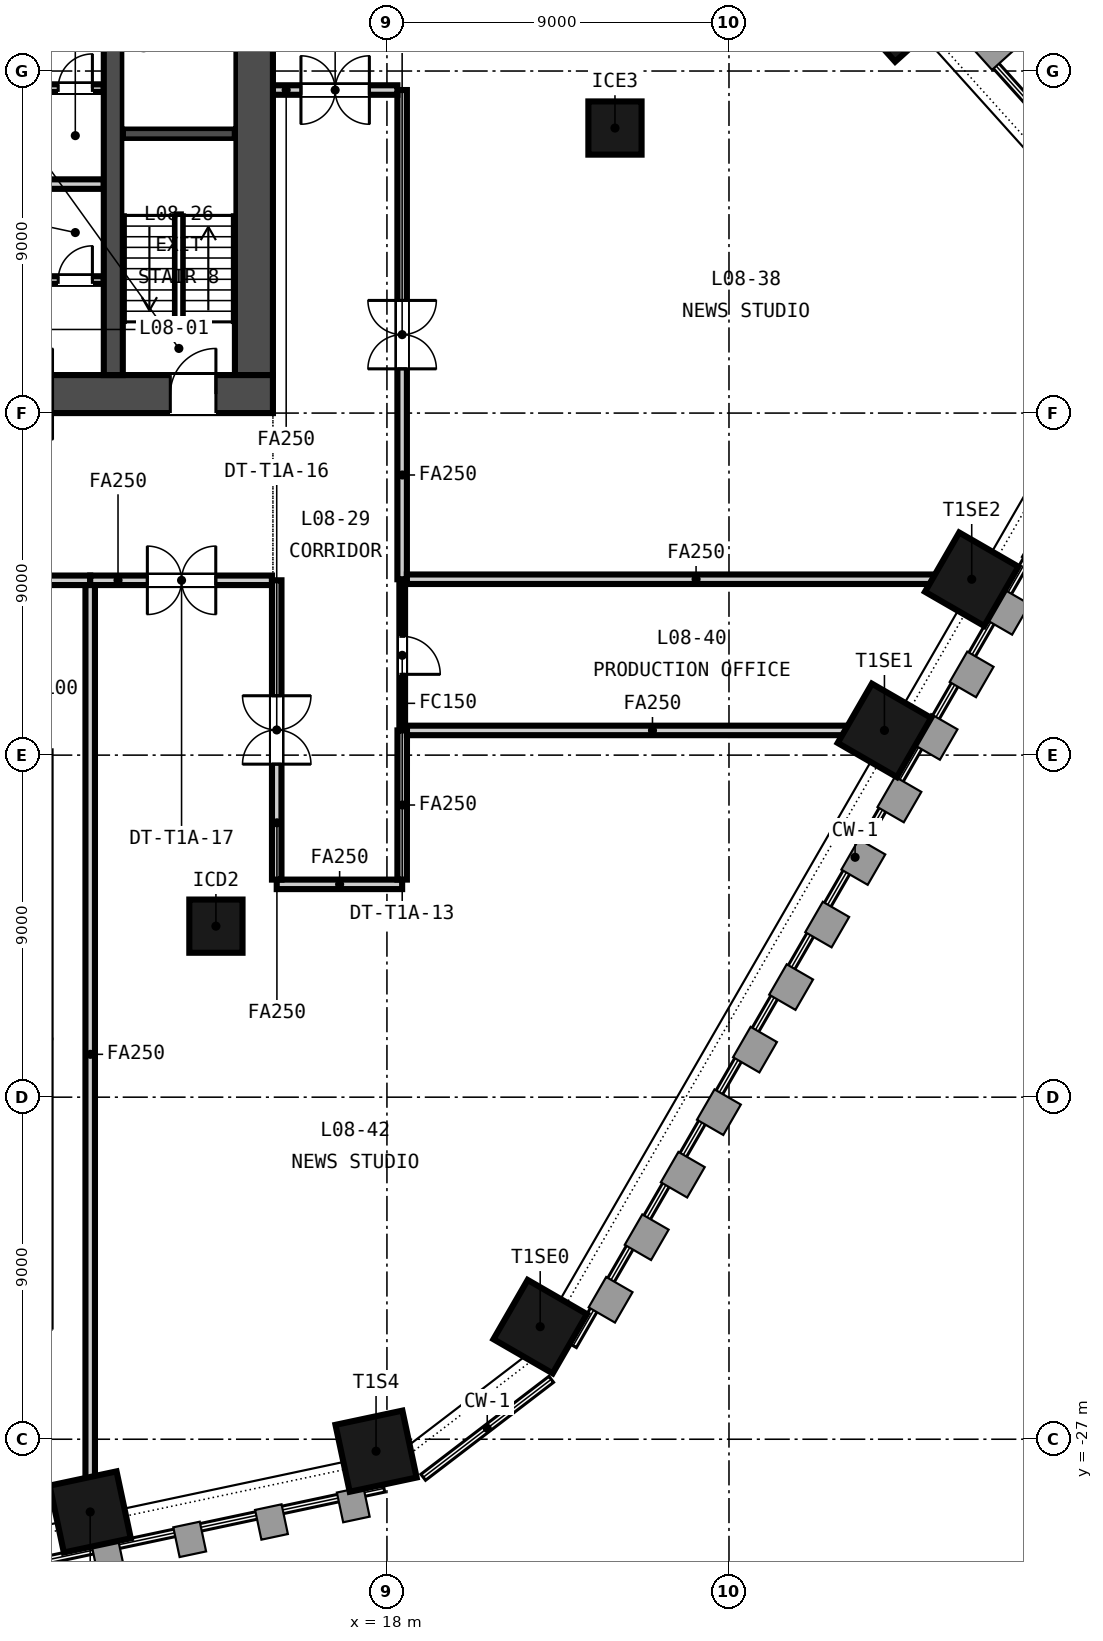
"""IFC4 building model, lengths in metres.
Left out: names, types, materials, properties, quantities, classifications, styles, units other than length and angle.
Written with IfcOpenShell. Run it as: python <this file> out.ifc"""

import sys

from ifc_helpers import new_model, si_unit, direction, frame, frame_2d, origin, origin_2d, place, context, subcontext, project, spatial, rectangle, extrude, element, fill, save


model = new_model("IFC4")
c1 = context("Model", 3, precision=1e-05, world=origin(), true_north=direction((0.0, 1.0)))
c2 = subcontext(c1, "Body", "Model", "MODEL_VIEW")
j1 = project(units=[si_unit("LENGTHUNIT", "METRE"), si_unit("PLANEANGLEUNIT", "RADIAN")], contexts=[c1])
p1 = place(None, origin())
s1 = spatial("IfcSite", under=j1, at=p1, CompositionType="ELEMENT")
p2 = place(p1, origin())
s2 = spatial("IfcBuilding", under=s1, at=p2, CompositionType="ELEMENT")
p3 = place(p2, frame((0.0, 0.0, 43.3)))
s3 = spatial("IfcBuildingStorey", under=s2, at=p3, CompositionType="ELEMENT", Elevation=43.3)
p4 = place(p3, frame((-15.0, 0.5, -0.15), z_axis=(0.0, 0.0, 1.0), x_axis=(1.0, 0.0, 0.0)))
e1 = element("IfcWall", 1, at=p4, inside=s3, PredefinedType="SOLIDWALL", context=c2, shape_type="SweptSolid", body=[
    extrude(rectangle(XDim=30.0, YDim=1.0, at=frame_2d((15.0, 0.0))), origin(), (0.0, 0.0, 1.0), 3.65),
])
p5 = place(p4, frame((5.8, 0.0, 0.15)))
e2 = element("IfcOpeningElement", 2, at=p5, cuts=e1, PredefinedType="OPENING", context=c2, shape_type="SweptSolid", body=[
    extrude(rectangle(XDim=2.4, YDim=2.4, at=frame_2d((1.2, 1.2))), frame((0.0, 0.51, 0.0), z_axis=(0.0, -1.0, 0.0), x_axis=(1.0, 0.0, 0.0)), (0.0, 0.0, 1.0), 1.02),
])
p6 = place(p4, frame((13.8, 0.0, 0.15)))
e3 = element("IfcOpeningElement", 3, at=p6, cuts=e1, PredefinedType="OPENING", context=c2, shape_type="SweptSolid", body=[
    extrude(rectangle(XDim=2.4, YDim=2.4, at=frame_2d((1.2, 1.2))), frame((0.0, 0.51, 0.0), z_axis=(0.0, -1.0, 0.0), x_axis=(1.0, 0.0, 0.0)), (0.0, 0.0, 1.0), 1.02),
])
p7 = place(p4, frame((21.8, 0.0, 0.15)))
e4 = element("IfcOpeningElement", 4, at=p7, cuts=e1, PredefinedType="OPENING", context=c2, shape_type="SweptSolid", body=[
    extrude(rectangle(XDim=2.4, YDim=2.4, at=frame_2d((1.2, 1.2))), frame((0.0, 0.51, 0.0), z_axis=(0.0, -1.0, 0.0), x_axis=(1.0, 0.0, 0.0)), (0.0, 0.0, 1.0), 1.02),
])
p8 = place(p4, frame((1.5, 0.0, 0.15)))
e5 = element("IfcOpeningElement", 5, at=p8, cuts=e1, PredefinedType="OPENING", context=c2, shape_type="SweptSolid", body=[
    extrude(rectangle(XDim=1.2, YDim=2.1, at=frame_2d((0.6, 1.05))), frame((0.0, 0.51, 0.0), z_axis=(0.0, -1.0, 0.0), x_axis=(1.0, 0.0, 0.0)), (0.0, 0.0, 1.0), 1.02),
])
p9 = place(p4, frame((27.3, 0.0, 0.15)))
e6 = element("IfcOpeningElement", 6, at=p9, cuts=e1, PredefinedType="OPENING", context=c2, shape_type="SweptSolid", body=[
    extrude(rectangle(XDim=1.2, YDim=2.1, at=frame_2d((0.6, 1.05))), frame((0.0, 0.51, 0.0), z_axis=(0.0, -1.0, 0.0), x_axis=(1.0, 0.0, 0.0)), (0.0, 0.0, 1.0), 1.02),
])
p10 = place(p3, frame((14.5, 1.0, -0.15), z_axis=(0.0, 0.0, 1.0), x_axis=(0.0, 1.0, 0.0)))
e7 = element("IfcWall", 7, at=p10, inside=s3, PredefinedType="SOLIDWALL", context=c2, shape_type="SweptSolid", body=[
    extrude(rectangle(XDim=13.0, YDim=1.0, at=frame_2d((6.5, 0.0))), origin(), (0.0, 0.0, 1.0), 3.65),
])
p11 = place(p3, frame((10.8, 1.0, -0.15), z_axis=(0.0, 0.0, 1.0), x_axis=(0.0, 1.0, 0.0)))
e8 = element("IfcWall", 8, at=p11, inside=s3, PredefinedType="SOLIDWALL", context=c2, shape_type="SweptSolid", body=[
    extrude(rectangle(XDim=13.0, YDim=0.5, at=frame_2d((6.5, 0.0))), origin(), (0.0, 0.0, 1.0), 3.65),
])
for number, where, z_axis, x_axis in (
    (9, (10.192, -28.914, -0.15), (0.0, 0.0, 1.0), (0.978, 0.208, 0.0)),
    (10, (17.714, -27.315, -0.15), (0.0, 0.0, 1.0), (0.978, 0.208, 0.0)),
    (11, (22.032, -24.039, -0.15), (0.0, 0.0, 1.0), (0.5, 0.866, 0.0)),
    (12, (31.09, -8.35, -0.15), (0.0, 0.0, 1.0), (0.5, 0.866, 0.0)),
    (13, (33.387, -4.373, -0.15), (0.0, 0.0, 1.0), (0.5, 0.866, 0.0)),
    (14, (31.438, 10.517, -0.15), (0.0, 0.0, 1.0), (-0.669, 0.743, 0.0)),
):
    element("IfcColumn", number, at=place(p3, frame(where, z_axis=z_axis, x_axis=x_axis)), inside=s3, PredefinedType="COLUMN", context=c2, shape_type="SweptSolid", body=[
        extrude(rectangle(XDim=1.8, YDim=1.8, at=origin_2d()), origin(), (0.0, 0.0, 1.0), 3.65),
    ])
for number, where, z_axis, x_axis in (
    (15, (13.5, -13.5, -0.15), (0.0, 0.0, 1.0), (1.0, 0.0, 0.0)),
    (16, (24.0, 7.5, -0.15), (0.0, 0.0, 1.0), (1.0, 0.0, 0.0)),
):
    element("IfcColumn", number, at=place(p3, frame(where, z_axis=z_axis, x_axis=x_axis)), inside=s3, PredefinedType="COLUMN", context=c2, shape_type="SweptSolid", body=[
        extrude(rectangle(XDim=1.4, YDim=1.4, at=origin_2d()), origin(), (0.0, 0.0, 1.0), 3.65),
    ])
p12 = place(p3, frame((-10.55, 3.5, 0.0), z_axis=(0.0, 0.0, 1.0), x_axis=(1.0, 0.0, 0.0)))
e17 = element("IfcWall", 17, at=p12, inside=s3, PredefinedType="PARTITIONING", context=c2, shape_type="SweptSolid", body=[
    extrude(rectangle(XDim=21.1, YDim=0.2, at=frame_2d((10.55, 0.0))), origin(), (0.0, 0.0, 1.0), 3.5),
])
p13 = place(p12, frame((0.675, 0.0, 0.0)))
e18 = element("IfcOpeningElement", 18, at=p13, cuts=e17, PredefinedType="OPENING", context=c2, shape_type="SweptSolid", body=[
    extrude(rectangle(XDim=1.2, YDim=2.1, at=frame_2d((0.6, 1.05))), frame((0.0, 0.11, 0.0), z_axis=(0.0, -1.0, 0.0), x_axis=(1.0, 0.0, 0.0)), (0.0, 0.0, 1.0), 0.22),
])
p14 = place(p12, frame((3.475, 0.0, 0.0)))
e19 = element("IfcOpeningElement", 19, at=p14, cuts=e17, PredefinedType="OPENING", context=c2, shape_type="SweptSolid", body=[
    extrude(rectangle(XDim=1.2, YDim=2.1, at=frame_2d((0.6, 1.05))), frame((0.0, 0.11, 0.0), z_axis=(0.0, -1.0, 0.0), x_axis=(1.0, 0.0, 0.0)), (0.0, 0.0, 1.0), 0.22),
])
p15 = place(p12, frame((6.275, 0.0, 0.0)))
e20 = element("IfcOpeningElement", 20, at=p15, cuts=e17, PredefinedType="OPENING", context=c2, shape_type="SweptSolid", body=[
    extrude(rectangle(XDim=1.2, YDim=2.1, at=frame_2d((0.6, 1.05))), frame((0.0, 0.11, 0.0), z_axis=(0.0, -1.0, 0.0), x_axis=(1.0, 0.0, 0.0)), (0.0, 0.0, 1.0), 0.22),
])
p16 = place(p12, frame((9.075, 0.0, 0.0)))
e21 = element("IfcOpeningElement", 21, at=p16, cuts=e17, PredefinedType="OPENING", context=c2, shape_type="SweptSolid", body=[
    extrude(rectangle(XDim=1.2, YDim=2.1, at=frame_2d((0.6, 1.05))), frame((0.0, 0.11, 0.0), z_axis=(0.0, -1.0, 0.0), x_axis=(1.0, 0.0, 0.0)), (0.0, 0.0, 1.0), 0.22),
])
p17 = place(p12, frame((11.875, 0.0, 0.0)))
e22 = element("IfcOpeningElement", 22, at=p17, cuts=e17, PredefinedType="OPENING", context=c2, shape_type="SweptSolid", body=[
    extrude(rectangle(XDim=1.2, YDim=2.1, at=frame_2d((0.6, 1.05))), frame((0.0, 0.11, 0.0), z_axis=(0.0, -1.0, 0.0), x_axis=(1.0, 0.0, 0.0)), (0.0, 0.0, 1.0), 0.22),
])
p18 = place(p12, frame((14.675, 0.0, 0.0)))
e23 = element("IfcOpeningElement", 23, at=p18, cuts=e17, PredefinedType="OPENING", context=c2, shape_type="SweptSolid", body=[
    extrude(rectangle(XDim=1.2, YDim=2.1, at=frame_2d((0.6, 1.05))), frame((0.0, 0.11, 0.0), z_axis=(0.0, -1.0, 0.0), x_axis=(1.0, 0.0, 0.0)), (0.0, 0.0, 1.0), 0.22),
])
p19 = place(p12, frame((17.475, 0.0, 0.0)))
e24 = element("IfcOpeningElement", 24, at=p19, cuts=e17, PredefinedType="OPENING", context=c2, shape_type="SweptSolid", body=[
    extrude(rectangle(XDim=1.2, YDim=2.1, at=frame_2d((0.6, 1.05))), frame((0.0, 0.11, 0.0), z_axis=(0.0, -1.0, 0.0), x_axis=(1.0, 0.0, 0.0)), (0.0, 0.0, 1.0), 0.22),
])
p20 = place(p12, frame((19.9, 0.0, 0.0)))
e25 = element("IfcOpeningElement", 25, at=p20, cuts=e17, PredefinedType="OPENING", context=c2, shape_type="SweptSolid", body=[
    extrude(rectangle(XDim=0.9, YDim=2.1, at=frame_2d((0.45, 1.05))), frame((0.0, 0.11, 0.0), z_axis=(0.0, -1.0, 0.0), x_axis=(1.0, 0.0, 0.0)), (0.0, 0.0, 1.0), 0.22),
])
p21 = place(p3, frame((-10.55, 6.025, 0.0), z_axis=(0.0, 0.0, 1.0), x_axis=(1.0, 0.0, 0.0)))
e26 = element("IfcWall", 26, at=p21, inside=s3, PredefinedType="PARTITIONING", context=c2, shape_type="SweptSolid", body=[
    extrude(rectangle(XDim=21.1, YDim=0.25, at=frame_2d((10.55, 0.0))), origin(), (0.0, 0.0, 1.0), 3.5),
])
p22 = place(p3, frame((-4.125, 8.55, 0.0), z_axis=(0.0, 0.0, 1.0), x_axis=(1.0, 0.0, 0.0)))
e27 = element("IfcWall", 27, at=p22, inside=s3, PredefinedType="PARTITIONING", context=c2, shape_type="SweptSolid", body=[
    extrude(rectangle(XDim=14.675, YDim=0.2, at=frame_2d((7.337, 0.0))), origin(), (0.0, 0.0, 1.0), 3.5),
])
p23 = place(p22, frame((1.413, 0.0, 0.0)))
e28 = element("IfcOpeningElement", 28, at=p23, cuts=e27, PredefinedType="OPENING", context=c2, shape_type="SweptSolid", body=[
    extrude(rectangle(XDim=1.0, YDim=2.1, at=frame_2d((0.5, 1.05))), frame((0.0, 0.11, 0.0), z_axis=(0.0, -1.0, 0.0), x_axis=(1.0, 0.0, 0.0)), (0.0, 0.0, 1.0), 0.22),
])
p24 = place(p22, frame((5.0, 0.0, 0.0)))
e29 = element("IfcOpeningElement", 29, at=p24, cuts=e27, PredefinedType="OPENING", context=c2, shape_type="SweptSolid", body=[
    extrude(rectangle(XDim=1.0, YDim=2.1, at=frame_2d((0.5, 1.05))), frame((0.0, 0.11, 0.0), z_axis=(0.0, -1.0, 0.0), x_axis=(1.0, 0.0, 0.0)), (0.0, 0.0, 1.0), 0.22),
])
p25 = place(p22, frame((9.613, 0.0, 0.0)))
e30 = element("IfcOpeningElement", 30, at=p25, cuts=e27, PredefinedType="OPENING", context=c2, shape_type="SweptSolid", body=[
    extrude(rectangle(XDim=1.0, YDim=2.1, at=frame_2d((0.5, 1.05))), frame((0.0, 0.11, 0.0), z_axis=(0.0, -1.0, 0.0), x_axis=(1.0, 0.0, 0.0)), (0.0, 0.0, 1.0), 0.22),
])
p26 = place(p22, frame((13.475, 0.0, 0.0)))
e31 = element("IfcOpeningElement", 31, at=p26, cuts=e27, PredefinedType="OPENING", context=c2, shape_type="SweptSolid", body=[
    extrude(rectangle(XDim=0.9, YDim=2.1, at=frame_2d((0.45, 1.05))), frame((0.0, 0.11, 0.0), z_axis=(0.0, -1.0, 0.0), x_axis=(1.0, 0.0, 0.0)), (0.0, 0.0, 1.0), 0.22),
])
p27 = place(p3, frame((11.05, 7.35, -0.15), z_axis=(0.0, 0.0, 1.0), x_axis=(1.0, 0.0, 0.0)))
e32 = element("IfcWall", 32, at=p27, inside=s3, PredefinedType="SOLIDWALL", context=c2, shape_type="SweptSolid", body=[
    extrude(rectangle(XDim=2.95, YDim=0.3, at=frame_2d((1.475, 0.0))), origin(), (0.0, 0.0, 1.0), 3.65),
])
p28 = place(p3, frame((10.192, -4.4, 0.0), z_axis=(0.0, 0.0, 1.0), x_axis=(-1.0, 0.0, 0.0)))
e33 = element("IfcWall", 33, at=p28, inside=s3, PredefinedType="PARTITIONING", context=c2, shape_type="SweptSolid", body=[
    extrude(rectangle(XDim=25.167, YDim=0.25, at=frame_2d((12.583, 0.0))), origin(), (0.0, 0.0, 1.0), 2.741),
])
p29 = place(p28, frame((11.696, 0.0, 0.0)))
e34 = element("IfcOpeningElement", 34, at=p29, cuts=e33, PredefinedType="OPENING", context=c2, shape_type="SweptSolid", body=[
    extrude(rectangle(XDim=1.8, YDim=2.1, at=frame_2d((0.9, 1.05))), frame((0.0, 0.135, 0.0), z_axis=(0.0, -1.0, 0.0), x_axis=(1.0, 0.0, 0.0)), (0.0, 0.0, 1.0), 0.27),
])
p30 = place(p3, frame((14.975, -4.4, 0.0), z_axis=(0.0, 0.0, 1.0), x_axis=(-1.0, 0.0, 0.0)))
e35 = element("IfcWall", 35, at=p30, inside=s3, PredefinedType="PARTITIONING", context=c2, shape_type="SweptSolid", body=[
    extrude(rectangle(XDim=4.783, YDim=0.25, at=frame_2d((2.392, 0.0))), origin(), (0.0, 0.0, 1.0), 2.741),
])
p31 = place(p30, frame((1.479, 0.0, 0.0)))
e36 = element("IfcOpeningElement", 36, at=p31, cuts=e35, PredefinedType="OPENING", context=c2, shape_type="SweptSolid", body=[
    extrude(rectangle(XDim=1.8, YDim=2.1, at=frame_2d((0.9, 1.05))), frame((0.0, 0.135, 0.0), z_axis=(0.0, -1.0, 0.0), x_axis=(1.0, 0.0, 0.0)), (0.0, 0.0, 1.0), 0.27),
])
p32 = place(p3, frame((18.4, 8.5, 0.0), z_axis=(0.0, 0.0, 1.0), x_axis=(0.0, -1.0, 0.0)))
e37 = element("IfcWall", 37, at=p32, inside=s3, PredefinedType="PARTITIONING", context=c2, shape_type="SweptSolid", body=[
    extrude(rectangle(XDim=12.872, YDim=0.25, at=frame_2d((6.436, 0.0))), origin(), (0.0, 0.0, 1.0), 2.741),
])
p33 = place(p32, frame((5.536, 0.0, 0.0)))
e38 = element("IfcOpeningElement", 38, at=p33, cuts=e37, PredefinedType="OPENING", context=c2, shape_type="SweptSolid", body=[
    extrude(rectangle(XDim=1.8, YDim=2.1, at=frame_2d((0.9, 1.05))), frame((0.0, 0.135, 0.0), z_axis=(0.0, -1.0, 0.0), x_axis=(1.0, 0.0, 0.0)), (0.0, 0.0, 1.0), 0.27),
])
p34 = place(p3, frame((18.402, -4.398, 0.0), z_axis=(0.0, 0.0, 1.0), x_axis=(0.0, -1.0, 0.0)))
e39 = element("IfcWall", 39, at=p34, inside=s3, PredefinedType="PARTITIONING", context=c2, shape_type="SweptSolid", body=[
    extrude(rectangle(XDim=3.952, YDim=0.15, at=frame_2d((1.976, 0.0))), origin(), (0.0, 0.0, 1.0), 2.741),
])
p35 = place(p34, frame((1.476, 0.0, 0.0)))
e40 = element("IfcOpeningElement", 40, at=p35, cuts=e39, PredefinedType="OPENING", context=c2, shape_type="SweptSolid", body=[
    extrude(rectangle(XDim=1.0, YDim=2.1, at=frame_2d((0.5, 1.05))), frame((0.0, 0.085, 0.0), z_axis=(0.0, -1.0, 0.0), x_axis=(1.0, 0.0, 0.0)), (0.0, 0.0, 1.0), 0.17),
])
p36 = place(p3, frame((18.4, -12.4, 0.0), z_axis=(0.0, 0.0, 1.0), x_axis=(-1.0, 0.0, 0.0)))
e41 = element("IfcWall", 41, at=p36, inside=s3, PredefinedType="PARTITIONING", context=c2, shape_type="SweptSolid", body=[
    extrude(rectangle(XDim=3.3, YDim=0.25, at=frame_2d((1.65, 0.0))), origin(), (0.0, 0.0, 1.0), 2.741),
])
p37 = place(p3, frame((18.402, -8.35, 0.0), z_axis=(0.0, 0.0, 1.0), x_axis=(-0.000497636166, -0.999999876179, 0.0)))
e42 = element("IfcWall", 42, at=p37, inside=s3, PredefinedType="PARTITIONING", context=c2, shape_type="SweptSolid", body=[
    extrude(rectangle(XDim=3.925, YDim=0.25, at=frame_2d((1.962, 0.0))), origin(), (0.0, 0.0, 1.0), 2.741),
])
p38 = place(p3, frame((15.0, 8.5, 0.0), z_axis=(0.0, 0.0, 1.0), x_axis=(1.0, 0.0, 0.0)))
e43 = element("IfcWall", 43, at=p38, inside=s3, PredefinedType="PARTITIONING", context=c2, shape_type="SweptSolid", body=[
    extrude(rectangle(XDim=3.275, YDim=0.25, at=frame_2d((1.637, 0.0))), origin(), (0.0, 0.0, 1.0), 2.741),
])
p39 = place(p38, frame((0.738, 0.0, 0.0)))
e44 = element("IfcOpeningElement", 44, at=p39, cuts=e43, PredefinedType="OPENING", context=c2, shape_type="SweptSolid", body=[
    extrude(rectangle(XDim=1.8, YDim=2.1, at=frame_2d((0.9, 1.05))), frame((0.0, 0.135, 0.0), z_axis=(0.0, -1.0, 0.0), x_axis=(1.0, 0.0, 0.0)), (0.0, 0.0, 1.0), 0.27),
])
p40 = place(p3, frame((18.525, -4.372, 0.0), z_axis=(0.0, 0.0, 1.0), x_axis=(1.0, 0.0, 0.0)))
e45 = element("IfcWall", 45, at=p40, inside=s3, PredefinedType="PARTITIONING", context=c2, shape_type="SweptSolid", body=[
    extrude(rectangle(XDim=15.208, YDim=0.25, at=frame_2d((7.604, 0.0))), origin(), (0.0, 0.0, 1.0), 2.741),
])
p41 = place(p3, frame((18.527, -8.35, 0.0), z_axis=(0.0, 0.0, 1.0), x_axis=(1.0, 0.0, 0.0)))
e46 = element("IfcWall", 46, at=p41, inside=s3, PredefinedType="PARTITIONING", context=c2, shape_type="SweptSolid", body=[
    extrude(rectangle(XDim=12.91, YDim=0.25, at=frame_2d((6.455, 0.0))), origin(), (0.0, 0.0, 1.0), 2.741),
])
p42 = place(p3, frame((10.192, -29.22, 0.0), z_axis=(0.0, 0.0, 1.0), x_axis=(0.0, 1.0, 0.0)))
e47 = element("IfcWall", 47, at=p42, inside=s3, PredefinedType="PARTITIONING", context=c2, shape_type="SweptSolid", body=[
    extrude(rectangle(XDim=24.695, YDim=0.25, at=frame_2d((12.348, 0.0))), origin(), (0.0, 0.0, 1.0), 2.741),
])
p43 = place(p3, frame((15.1, -12.275, 0.0), z_axis=(0.0, 0.0, 1.0), x_axis=(0.0, 1.0, 0.0)))
e48 = element("IfcWall", 48, at=p43, inside=s3, PredefinedType="PARTITIONING", context=c2, shape_type="SweptSolid", body=[
    extrude(rectangle(XDim=7.875, YDim=0.25, at=frame_2d((3.938, 0.0))), origin(), (0.0, 0.0, 1.0), 2.741),
])
p44 = place(p43, frame((3.038, 0.0, 0.0)))
e49 = element("IfcOpeningElement", 49, at=p44, cuts=e48, PredefinedType="OPENING", context=c2, shape_type="SweptSolid", body=[
    extrude(rectangle(XDim=1.8, YDim=2.1, at=frame_2d((0.9, 1.05))), frame((0.0, 0.135, 0.0), z_axis=(0.0, -1.0, 0.0), x_axis=(1.0, 0.0, 0.0)), (0.0, 0.0, 1.0), 0.27),
])
p45 = place(p20, origin())
e50 = element("IfcDoor", 50, at=p45, inside=s3, OperationType="SINGLE_SWING_RIGHT", PredefinedType="DOOR", context=c2, shape_type="SweptSolid", body=[
    extrude(rectangle(XDim=0.9, YDim=2.1, at=frame_2d((0.45, 1.05))), frame((0.0, 0.025, 0.0), z_axis=(0.0, -1.0, 0.0), x_axis=(1.0, 0.0, 0.0)), (0.0, 0.0, 1.0), 0.05),
])
fill(e25, e50)
p46 = place(p26, origin())
e51 = element("IfcDoor", 51, at=p46, inside=s3, OperationType="SINGLE_SWING_RIGHT", PredefinedType="DOOR", context=c2, shape_type="SweptSolid", body=[
    extrude(rectangle(XDim=0.9, YDim=2.1, at=frame_2d((0.45, 1.05))), frame((0.0, 0.025, 0.0), z_axis=(0.0, -1.0, 0.0), x_axis=(1.0, 0.0, 0.0)), (0.0, 0.0, 1.0), 0.05),
])
fill(e31, e51)
p47 = place(p7, origin())
e52 = element("IfcDoor", 52, at=p47, inside=s3, OperationType="DOUBLE_DOOR_DOUBLE_SWING", PredefinedType="DOOR", context=c2, shape_type="SweptSolid", body=[
    extrude(rectangle(XDim=2.4, YDim=2.4, at=frame_2d((1.2, 1.2))), frame((0.0, 0.025, 0.0), z_axis=(0.0, -1.0, 0.0), x_axis=(1.0, 0.0, 0.0)), (0.0, 0.0, 1.0), 0.05),
])
fill(e4, e52)
p48 = place(p9, origin())
e53 = element("IfcDoor", 53, at=p48, inside=s3, OperationType="SINGLE_SWING_RIGHT", PredefinedType="DOOR", context=c2, shape_type="SweptSolid", body=[
    extrude(rectangle(XDim=1.2, YDim=2.1, at=frame_2d((0.6, 1.05))), frame((0.0, 0.025, 0.0), z_axis=(0.0, -1.0, 0.0), x_axis=(1.0, 0.0, 0.0)), (0.0, 0.0, 1.0), 0.05),
])
fill(e6, e53)
p49 = place(p33, origin())
e54 = element("IfcDoor", 54, at=p49, inside=s3, OperationType="DOUBLE_DOOR_DOUBLE_SWING", PredefinedType="DOOR", context=c2, shape_type="SweptSolid", body=[
    extrude(rectangle(XDim=1.8, YDim=2.1, at=frame_2d((0.9, 1.05))), frame((0.0, 0.025, 0.0), z_axis=(0.0, -1.0, 0.0), x_axis=(1.0, 0.0, 0.0)), (0.0, 0.0, 1.0), 0.05),
])
fill(e38, e54)
p50 = place(p39, origin())
e55 = element("IfcDoor", 55, at=p50, inside=s3, OperationType="DOUBLE_DOOR_DOUBLE_SWING", PredefinedType="DOOR", context=c2, shape_type="SweptSolid", body=[
    extrude(rectangle(XDim=1.8, YDim=2.1, at=frame_2d((0.9, 1.05))), frame((0.0, 0.025, 0.0), z_axis=(0.0, -1.0, 0.0), x_axis=(1.0, 0.0, 0.0)), (0.0, 0.0, 1.0), 0.05),
])
fill(e44, e55)
p51 = place(p35, origin())
e56 = element("IfcDoor", 56, at=p51, inside=s3, OperationType="SINGLE_SWING_RIGHT", PredefinedType="DOOR", context=c2, shape_type="SweptSolid", body=[
    extrude(rectangle(XDim=1.0, YDim=2.1, at=frame_2d((0.5, 1.05))), frame((0.0, 0.025, 0.0), z_axis=(0.0, -1.0, 0.0), x_axis=(1.0, 0.0, 0.0)), (0.0, 0.0, 1.0), 0.05),
])
fill(e40, e56)
p52 = place(p44, origin())
e57 = element("IfcDoor", 57, at=p52, inside=s3, OperationType="DOUBLE_DOOR_DOUBLE_SWING", PredefinedType="DOOR", context=c2, shape_type="SweptSolid", body=[
    extrude(rectangle(XDim=1.8, YDim=2.1, at=frame_2d((0.9, 1.05))), frame((0.0, 0.025, 0.0), z_axis=(0.0, -1.0, 0.0), x_axis=(1.0, 0.0, 0.0)), (0.0, 0.0, 1.0), 0.05),
])
fill(e49, e57)
p53 = place(p31, origin())
e58 = element("IfcDoor", 58, at=p53, inside=s3, OperationType="DOUBLE_DOOR_DOUBLE_SWING", PredefinedType="DOOR", context=c2, shape_type="SweptSolid", body=[
    extrude(rectangle(XDim=1.8, YDim=2.1, at=frame_2d((0.9, 1.05))), frame((0.0, 0.025, 0.0), z_axis=(0.0, -1.0, 0.0), x_axis=(1.0, 0.0, 0.0)), (0.0, 0.0, 1.0), 0.05),
])
fill(e36, e58)
save(model, sys.argv[1])
